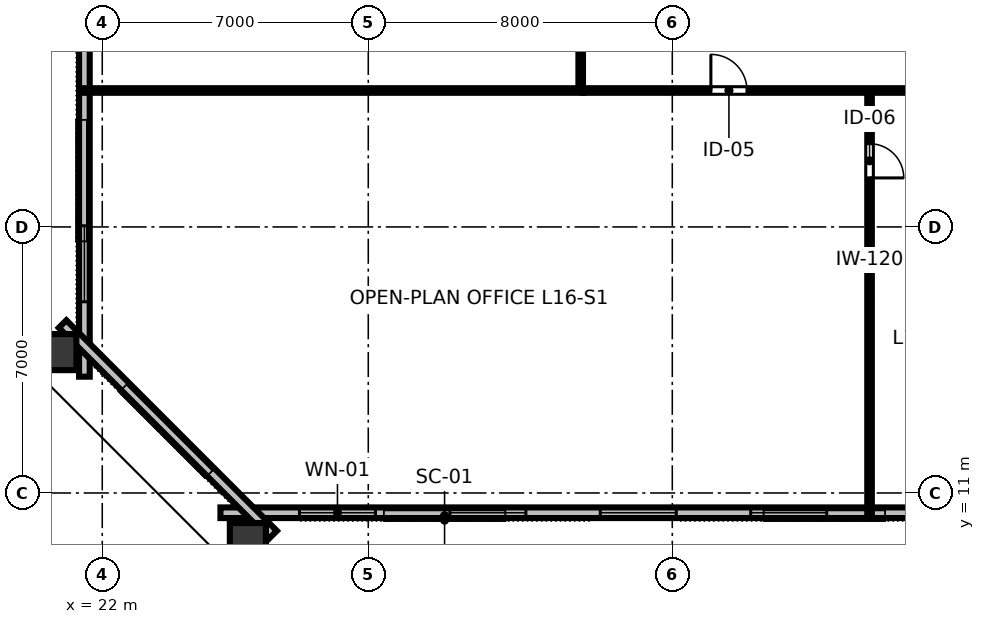
"""IFC4 building model, lengths in metres.
Left out: names, types, materials, properties, quantities, classifications, styles, units other than length and angle.
Written with IfcOpenShell. Run it as: python <this file> out.ifc"""

import sys

from ifc_helpers import new_model, si_unit, direction, frame, frame_2d, origin, origin_2d, place, context, subcontext, project, spatial, rectangle, hollow_rectangle, extrude, element, fill, save


model = new_model("IFC4")
c1 = context("Model", 3, precision=1e-05, world=origin(), true_north=direction((0.0, 1.0)))
c2 = subcontext(c1, "Body", "Model", "MODEL_VIEW")
j1 = project(units=[si_unit("LENGTHUNIT", "METRE"), si_unit("PLANEANGLEUNIT", "RADIAN")], contexts=[c1])
p1 = place(None, origin())
s1 = spatial("IfcSite", under=j1, at=p1, CompositionType="ELEMENT")
p2 = place(p1, origin())
s2 = spatial("IfcBuilding", under=s1, at=p2, CompositionType="ELEMENT")
p3 = place(p2, frame((0.0, 0.0, 64.0)))
s3 = spatial("IfcBuildingStorey", under=s2, at=p3, CompositionType="ELEMENT", Elevation=64.0)
for number, where, z_axis, x_axis in (
    (1, (25.832, 9.635, 0.0), (0.0, 0.0, 1.0), (1.0, 0.0, 0.0)),
    (2, (20.744, 14.707, 0.0), (0.0, 0.0, 1.0), (0.0, 1.0, 0.0)),
):
    element("IfcColumn", number, at=place(p3, frame(where, z_axis=z_axis, x_axis=x_axis)), inside=s3, PredefinedType="COLUMN", context=c2, shape_type="SweptSolid", body=[
        extrude(hollow_rectangle(XDim=0.95, YDim=1.15, WallThickness=0.06, at=origin_2d()), origin(), (0.0, 0.0, 1.0), 3.358),
    ])
p4 = place(p3, frame((25.11, 10.48, 0.0), z_axis=(0.0, 0.0, 1.0), x_axis=(1.0, 0.0, 0.0)))
e3 = element("IfcWall", 3, at=p4, inside=s3, PredefinedType="STANDARD", context=c2, shape_type="SweptSolid", body=[
    extrude(rectangle(XDim=41.78, YDim=0.28, at=frame_2d((20.89, 0.0))), origin(), (0.0, 0.0, 1.0), 3.36),
])
p5 = place(p4, frame((2.079, 0.0, 0.8)))
e4 = element("IfcOpeningElement", 4, at=p5, cuts=e3, PredefinedType="OPENING", context=c2, shape_type="SweptSolid", body=[
    extrude(rectangle(XDim=2.0, YDim=1.95, at=frame_2d((1.0, 0.975))), frame((0.0, 0.15, 0.0), z_axis=(0.0, -1.0, 0.0), x_axis=(1.0, 0.0, 0.0)), (0.0, 0.0, 1.0), 0.3),
])
p6 = place(p4, frame((6.037, 0.0, 0.8)))
e5 = element("IfcOpeningElement", 5, at=p6, cuts=e3, PredefinedType="OPENING", context=c2, shape_type="SweptSolid", body=[
    extrude(rectangle(XDim=2.0, YDim=1.95, at=frame_2d((1.0, 0.975))), frame((0.0, 0.15, 0.0), z_axis=(0.0, -1.0, 0.0), x_axis=(1.0, 0.0, 0.0)), (0.0, 0.0, 1.0), 0.3),
])
p7 = place(p4, frame((9.995, 0.0, 0.8)))
e6 = element("IfcOpeningElement", 6, at=p7, cuts=e3, PredefinedType="OPENING", context=c2, shape_type="SweptSolid", body=[
    extrude(rectangle(XDim=2.0, YDim=1.95, at=frame_2d((1.0, 0.975))), frame((0.0, 0.15, 0.0), z_axis=(0.0, -1.0, 0.0), x_axis=(1.0, 0.0, 0.0)), (0.0, 0.0, 1.0), 0.3),
])
p8 = place(p4, frame((13.953, 0.0, 0.8)))
e7 = element("IfcOpeningElement", 7, at=p8, cuts=e3, PredefinedType="OPENING", context=c2, shape_type="SweptSolid", body=[
    extrude(rectangle(XDim=2.0, YDim=1.95, at=frame_2d((1.0, 0.975))), frame((0.0, 0.15, 0.0), z_axis=(0.0, -1.0, 0.0), x_axis=(1.0, 0.0, 0.0)), (0.0, 0.0, 1.0), 0.3),
])
p9 = place(p4, frame((29.785, 0.0, 0.8)))
e8 = element("IfcOpeningElement", 8, at=p9, cuts=e3, PredefinedType="OPENING", context=c2, shape_type="SweptSolid", body=[
    extrude(rectangle(XDim=2.0, YDim=1.95, at=frame_2d((1.0, 0.975))), frame((0.0, 0.15, 0.0), z_axis=(0.0, -1.0, 0.0), x_axis=(1.0, 0.0, 0.0)), (0.0, 0.0, 1.0), 0.3),
])
p10 = place(p4, frame((33.743, 0.0, 0.8)))
e9 = element("IfcOpeningElement", 9, at=p10, cuts=e3, PredefinedType="OPENING", context=c2, shape_type="SweptSolid", body=[
    extrude(rectangle(XDim=2.0, YDim=1.95, at=frame_2d((1.0, 0.975))), frame((0.0, 0.15, 0.0), z_axis=(0.0, -1.0, 0.0), x_axis=(1.0, 0.0, 0.0)), (0.0, 0.0, 1.0), 0.3),
])
p11 = place(p4, frame((37.701, 0.0, 0.8)))
e10 = element("IfcOpeningElement", 10, at=p11, cuts=e3, PredefinedType="OPENING", context=c2, shape_type="SweptSolid", body=[
    extrude(rectangle(XDim=2.0, YDim=1.95, at=frame_2d((1.0, 0.975))), frame((0.0, 0.15, 0.0), z_axis=(0.0, -1.0, 0.0), x_axis=(1.0, 0.0, 0.0)), (0.0, 0.0, 1.0), 0.3),
])
p12 = place(p3, frame((21.53, 49.94, 0.0), z_axis=(0.0, 0.0, 1.0), x_axis=(0.0, -1.0, 0.0)))
e11 = element("IfcWall", 11, at=p12, inside=s3, PredefinedType="STANDARD", context=c2, shape_type="SweptSolid", body=[
    extrude(rectangle(XDim=35.88, YDim=0.28, at=frame_2d((17.94, 0.0))), origin(), (0.0, 0.0, 1.0), 3.36),
])
p13 = place(p12, frame((14.57, 0.0, 0.0)))
e12 = element("IfcOpeningElement", 12, at=p13, cuts=e11, PredefinedType="OPENING", context=c2, shape_type="SweptSolid", body=[
    extrude(rectangle(XDim=1.4, YDim=2.15, at=frame_2d((0.7, 1.075))), frame((0.0, 0.15, 0.0), z_axis=(0.0, -1.0, 0.0), x_axis=(1.0, 0.0, 0.0)), (0.0, 0.0, 1.0), 0.3),
])
p14 = place(p12, frame((1.971, 0.0, 0.8)))
e13 = element("IfcOpeningElement", 13, at=p14, cuts=e11, PredefinedType="OPENING", context=c2, shape_type="SweptSolid", body=[
    extrude(rectangle(XDim=2.0, YDim=1.95, at=frame_2d((1.0, 0.975))), frame((0.0, 0.15, 0.0), z_axis=(0.0, -1.0, 0.0), x_axis=(1.0, 0.0, 0.0)), (0.0, 0.0, 1.0), 0.3),
])
p15 = place(p12, frame((9.456, 0.0, 0.8)))
e14 = element("IfcOpeningElement", 14, at=p15, cuts=e11, PredefinedType="OPENING", context=c2, shape_type="SweptSolid", body=[
    extrude(rectangle(XDim=2.0, YDim=1.95, at=frame_2d((1.0, 0.975))), frame((0.0, 0.15, 0.0), z_axis=(0.0, -1.0, 0.0), x_axis=(1.0, 0.0, 0.0)), (0.0, 0.0, 1.0), 0.3),
])
p16 = place(p12, frame((20.682, 0.0, 0.8)))
e15 = element("IfcOpeningElement", 15, at=p16, cuts=e11, PredefinedType="OPENING", context=c2, shape_type="SweptSolid", body=[
    extrude(rectangle(XDim=2.0, YDim=1.95, at=frame_2d((1.0, 0.975))), frame((0.0, 0.15, 0.0), z_axis=(0.0, -1.0, 0.0), x_axis=(1.0, 0.0, 0.0)), (0.0, 0.0, 1.0), 0.3),
])
p17 = place(p12, frame((24.424, 0.0, 0.8)))
e16 = element("IfcOpeningElement", 16, at=p17, cuts=e11, PredefinedType="OPENING", context=c2, shape_type="SweptSolid", body=[
    extrude(rectangle(XDim=2.0, YDim=1.95, at=frame_2d((1.0, 0.975))), frame((0.0, 0.15, 0.0), z_axis=(0.0, -1.0, 0.0), x_axis=(1.0, 0.0, 0.0)), (0.0, 0.0, 1.0), 0.3),
])
p18 = place(p12, frame((31.909, 0.0, 0.8)))
e17 = element("IfcOpeningElement", 17, at=p18, cuts=e11, PredefinedType="OPENING", context=c2, shape_type="SweptSolid", body=[
    extrude(rectangle(XDim=2.0, YDim=1.95, at=frame_2d((1.0, 0.975))), frame((0.0, 0.15, 0.0), z_axis=(0.0, -1.0, 0.0), x_axis=(1.0, 0.0, 0.0)), (0.0, 0.0, 1.0), 0.3),
])
p19 = place(p3, frame((20.956, 15.446, 0.0), z_axis=(0.0, 0.0, 1.0), x_axis=(0.707106781187, -0.707106781187, 0.0)))
e18 = element("IfcWall", 18, at=p19, inside=s3, PredefinedType="STANDARD", context=c2, shape_type="SweptSolid", body=[
    extrude(rectangle(XDim=7.834, YDim=0.28, at=frame_2d((3.917, 0.0))), origin(), (0.0, 0.0, 1.0), 3.36),
])
p20 = place(p3, frame((42.191, 21.59, 0.0), z_axis=(0.0, 0.0, 1.0), x_axis=(0.0, -1.0, 0.0)))
e19 = element("IfcWall", 19, at=p20, inside=s3, PredefinedType="PARTITIONING", context=c2, shape_type="SweptSolid", body=[
    extrude(rectangle(XDim=11.11, YDim=0.12, at=frame_2d((5.555, 0.0))), origin(), (0.0, 0.0, 1.0), 2.64),
])
p21 = place(p20, frame((1.4, 0.0, 0.0)))
e20 = element("IfcOpeningElement", 20, at=p21, cuts=e19, PredefinedType="OPENING", context=c2, shape_type="SweptSolid", body=[
    extrude(rectangle(XDim=0.9, YDim=2.15, at=frame_2d((0.45, 1.075))), frame((0.0, 0.07, 0.0), z_axis=(0.0, -1.0, 0.0), x_axis=(1.0, 0.0, 0.0)), (0.0, 0.0, 1.0), 0.14),
])
p22 = place(p3, frame((34.65, 21.59, 0.0), z_axis=(0.0, 0.0, 1.0), x_axis=(1.0, 0.0, 0.0)))
e21 = element("IfcWall", 21, at=p22, inside=s3, PredefinedType="PARTITIONING", context=c2, shape_type="SweptSolid", body=[
    extrude(rectangle(XDim=22.7, YDim=0.12, at=frame_2d((11.35, 0.0))), origin(), (0.0, 0.0, 1.0), 2.64),
])
p23 = place(p22, frame((3.365, 0.0, 0.0)))
e22 = element("IfcOpeningElement", 22, at=p23, cuts=e21, PredefinedType="OPENING", context=c2, shape_type="SweptSolid", body=[
    extrude(rectangle(XDim=0.95, YDim=2.15, at=frame_2d((0.475, 1.075))), frame((0.0, 0.07, 0.0), z_axis=(0.0, -1.0, 0.0), x_axis=(1.0, 0.0, 0.0)), (0.0, 0.0, 1.0), 0.14),
])
p24 = place(p22, frame((8.718, 0.0, 0.0)))
e23 = element("IfcOpeningElement", 23, at=p24, cuts=e21, PredefinedType="OPENING", context=c2, shape_type="SweptSolid", body=[
    extrude(rectangle(XDim=0.95, YDim=2.15, at=frame_2d((0.475, 1.075))), frame((0.0, 0.07, 0.0), z_axis=(0.0, -1.0, 0.0), x_axis=(1.0, 0.0, 0.0)), (0.0, 0.0, 1.0), 0.14),
])
p25 = place(p22, frame((13.651, 0.0, 0.0)))
e24 = element("IfcOpeningElement", 24, at=p25, cuts=e21, PredefinedType="OPENING", context=c2, shape_type="SweptSolid", body=[
    extrude(rectangle(XDim=0.95, YDim=2.15, at=frame_2d((0.475, 1.075))), frame((0.0, 0.07, 0.0), z_axis=(0.0, -1.0, 0.0), x_axis=(1.0, 0.0, 0.0)), (0.0, 0.0, 1.0), 0.14),
])
p26 = place(p22, frame((19.509, 0.0, 0.0)))
e25 = element("IfcOpeningElement", 25, at=p26, cuts=e21, PredefinedType="OPENING", context=c2, shape_type="SweptSolid", body=[
    extrude(rectangle(XDim=0.95, YDim=2.15, at=frame_2d((0.475, 1.075))), frame((0.0, 0.07, 0.0), z_axis=(0.0, -1.0, 0.0), x_axis=(1.0, 0.0, 0.0)), (0.0, 0.0, 1.0), 0.14),
])
p27 = place(p3, frame((34.59, 21.65, 0.0), z_axis=(0.0, 0.0, 1.0), x_axis=(0.0, 1.0, 0.0)))
e26 = element("IfcWall", 26, at=p27, inside=s3, PredefinedType="PARTITIONING", context=c2, shape_type="SweptSolid", body=[
    extrude(rectangle(XDim=20.7, YDim=0.12, at=frame_2d((10.35, 0.0))), origin(), (0.0, 0.0, 1.0), 2.64),
])
p28 = place(p27, frame((6.696, 0.0, 0.0)))
e27 = element("IfcOpeningElement", 27, at=p28, cuts=e26, PredefinedType="OPENING", context=c2, shape_type="SweptSolid", body=[
    extrude(rectangle(XDim=0.95, YDim=2.15, at=frame_2d((0.475, 1.075))), frame((0.0, 0.07, 0.0), z_axis=(0.0, -1.0, 0.0), x_axis=(1.0, 0.0, 0.0)), (0.0, 0.0, 1.0), 0.14),
])
p29 = place(p27, frame((16.846, 0.0, 0.0)))
e28 = element("IfcOpeningElement", 28, at=p29, cuts=e26, PredefinedType="OPENING", context=c2, shape_type="SweptSolid", body=[
    extrude(rectangle(XDim=0.95, YDim=2.15, at=frame_2d((0.475, 1.075))), frame((0.0, 0.07, 0.0), z_axis=(0.0, -1.0, 0.0), x_axis=(1.0, 0.0, 0.0)), (0.0, 0.0, 1.0), 0.14),
])
p30 = place(p3, frame((34.65, 21.59, 0.0), z_axis=(0.0, 0.0, 1.0), x_axis=(-1.0, 0.0, 0.0)))
e29 = element("IfcWall", 29, at=p30, inside=s3, PredefinedType="PARTITIONING", context=c2, shape_type="SweptSolid", body=[
    extrude(rectangle(XDim=13.12, YDim=0.12, at=frame_2d((6.56, 0.0))), origin(), (0.0, 0.0, 1.0), 2.64),
])
p31 = place(p5, origin())
e30 = element("IfcWindow", 30, at=p31, inside=s3, PartitioningType="SINGLE_PANEL", PredefinedType="WINDOW", context=c2, shape_type="SweptSolid", body=[
    extrude(rectangle(XDim=2.0, YDim=1.95, at=frame_2d((1.0, 0.975))), frame((0.0, 0.03, 0.0), z_axis=(0.0, -1.0, 0.0), x_axis=(1.0, 0.0, 0.0)), (0.0, 0.0, 1.0), 0.06),
])
fill(e4, e30)
p32 = place(p6, origin())
e31 = element("IfcWindow", 31, at=p32, inside=s3, PartitioningType="SINGLE_PANEL", PredefinedType="WINDOW", context=c2, shape_type="SweptSolid", body=[
    extrude(rectangle(XDim=2.0, YDim=1.95, at=frame_2d((1.0, 0.975))), frame((0.0, 0.03, 0.0), z_axis=(0.0, -1.0, 0.0), x_axis=(1.0, 0.0, 0.0)), (0.0, 0.0, 1.0), 0.06),
])
fill(e5, e31)
p33 = place(p7, origin())
e32 = element("IfcWindow", 32, at=p33, inside=s3, PartitioningType="SINGLE_PANEL", PredefinedType="WINDOW", context=c2, shape_type="SweptSolid", body=[
    extrude(rectangle(XDim=2.0, YDim=1.95, at=frame_2d((1.0, 0.975))), frame((0.0, 0.03, 0.0), z_axis=(0.0, -1.0, 0.0), x_axis=(1.0, 0.0, 0.0)), (0.0, 0.0, 1.0), 0.06),
])
fill(e6, e32)
p34 = place(p8, origin())
e33 = element("IfcWindow", 33, at=p34, inside=s3, PartitioningType="SINGLE_PANEL", PredefinedType="WINDOW", context=c2, shape_type="SweptSolid", body=[
    extrude(rectangle(XDim=2.0, YDim=1.95, at=frame_2d((1.0, 0.975))), frame((0.0, 0.03, 0.0), z_axis=(0.0, -1.0, 0.0), x_axis=(1.0, 0.0, 0.0)), (0.0, 0.0, 1.0), 0.06),
])
fill(e7, e33)
p35 = place(p18, origin())
e34 = element("IfcWindow", 34, at=p35, inside=s3, PartitioningType="SINGLE_PANEL", PredefinedType="WINDOW", context=c2, shape_type="SweptSolid", body=[
    extrude(rectangle(XDim=2.0, YDim=1.95, at=frame_2d((1.0, 0.975))), frame((0.0, 0.03, 0.0), z_axis=(0.0, -1.0, 0.0), x_axis=(1.0, 0.0, 0.0)), (0.0, 0.0, 1.0), 0.06),
])
fill(e17, e34)
p36 = place(p21, origin())
e35 = element("IfcDoor", 35, at=p36, inside=s3, OperationType="SINGLE_SWING_RIGHT", PredefinedType="DOOR", context=c2, shape_type="SweptSolid", body=[
    extrude(rectangle(XDim=0.9, YDim=2.15, at=frame_2d((0.45, 1.075))), frame((0.0, 0.025, 0.0), z_axis=(0.0, -1.0, 0.0), x_axis=(1.0, 0.0, 0.0)), (0.0, 0.0, 1.0), 0.05),
])
fill(e20, e35)
p37 = place(p23, origin())
e36 = element("IfcDoor", 36, at=p37, inside=s3, OperationType="SINGLE_SWING_LEFT", PredefinedType="DOOR", context=c2, shape_type="SweptSolid", body=[
    extrude(rectangle(XDim=0.95, YDim=2.15, at=frame_2d((0.475, 1.075))), frame((0.0, 0.025, 0.0), z_axis=(0.0, -1.0, 0.0), x_axis=(1.0, 0.0, 0.0)), (0.0, 0.0, 1.0), 0.05),
])
fill(e22, e36)
save(model, sys.argv[1])
